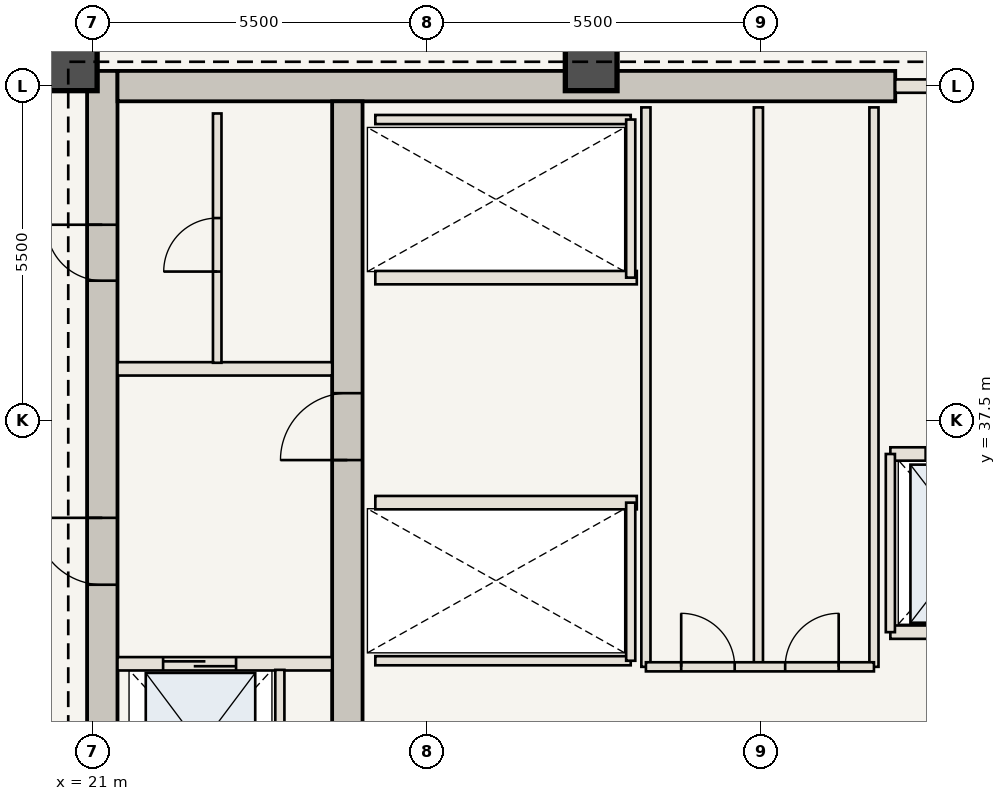
"""IFC4 building model, lengths in metres.
Left out: names, types, materials, properties, quantities, classifications, styles, units other than length and angle.
Written with IfcOpenShell. Run it as: python <this file> out.ifc"""

import sys

from ifc_helpers import new_model, si_unit, direction, frame, frame_2d, origin, origin_2d, place, context, subcontext, project, spatial, rectangle, extrude, element, fill, save


model = new_model("IFC4")
c1 = context("Model", 3, precision=1e-05, world=origin(), true_north=direction((0.0, 1.0)))
c2 = subcontext(c1, "Body", "Model", "MODEL_VIEW")
j1 = project(units=[si_unit("LENGTHUNIT", "METRE"), si_unit("PLANEANGLEUNIT", "RADIAN")], contexts=[c1])
p1 = place(None, origin())
s1 = spatial("IfcSite", under=j1, at=p1, CompositionType="ELEMENT")
p2 = place(p1, origin())
s2 = spatial("IfcBuilding", under=s1, at=p2, CompositionType="ELEMENT")
p3 = place(p2, frame((0.0, 0.0, 206.15)))
s3 = spatial("IfcBuildingStorey", under=s2, at=p3, CompositionType="ELEMENT", Elevation=206.15)
p4 = place(p3, frame((21.16, 30.6, 0.0), z_axis=(0.0, 0.0, 1.0), x_axis=(0.0, 1.0, 0.0)))
e1 = element("IfcWall", 1, at=p4, inside=s3, PredefinedType="SHEAR", context=c2, shape_type="SweptSolid", body=[
    extrude(rectangle(XDim=12.65, YDim=0.5, at=frame_2d((6.325, 0.0))), origin(), (0.0, 0.0, 1.0), 3.85),
])
p5 = place(p4, frame((4.2, 0.0, 0.0)))
e2 = element("IfcOpeningElement", 2, at=p5, cuts=e1, PredefinedType="OPENING", context=c2, shape_type="SweptSolid", body=[
    extrude(rectangle(XDim=1.1, YDim=2.15, at=frame_2d((0.55, 1.075))), frame((0.0, 0.26, 0.0), z_axis=(0.0, -1.0, 0.0), x_axis=(1.0, 0.0, 0.0)), (0.0, 0.0, 1.0), 0.52),
])
p6 = place(p4, frame((9.2, 0.0, 0.0)))
e3 = element("IfcOpeningElement", 3, at=p6, cuts=e1, PredefinedType="OPENING", context=c2, shape_type="SweptSolid", body=[
    extrude(rectangle(XDim=0.92, YDim=2.1, at=frame_2d((0.46, 1.05))), frame((0.0, 0.26, 0.0), z_axis=(0.0, -1.0, 0.0), x_axis=(1.0, 0.0, 0.0)), (0.0, 0.0, 1.0), 0.52),
])
p7 = place(p3, frame((21.41, 43.0, 0.0), z_axis=(0.0, 0.0, 1.0), x_axis=(1.0, 0.0, 0.0)))
e4 = element("IfcWall", 4, at=p7, inside=s3, PredefinedType="SHEAR", context=c2, shape_type="SweptSolid", body=[
    extrude(rectangle(XDim=12.79, YDim=0.5, at=frame_2d((6.395, 0.0))), origin(), (0.0, 0.0, 1.0), 3.85),
])
p8 = place(p3, frame((25.19, 30.6, 0.0), z_axis=(0.0, 0.0, 1.0), x_axis=(0.0, 1.0, 0.0)))
e5 = element("IfcWall", 5, at=p8, inside=s3, PredefinedType="SHEAR", context=c2, shape_type="SweptSolid", body=[
    extrude(rectangle(XDim=12.15, YDim=0.5, at=frame_2d((6.075, 0.0))), origin(), (0.0, 0.0, 1.0), 3.85),
])
p9 = place(p8, frame((6.25, 0.0, 0.0)))
e6 = element("IfcOpeningElement", 6, at=p9, cuts=e5, PredefinedType="OPENING", context=c2, shape_type="SweptSolid", body=[
    extrude(rectangle(XDim=1.1, YDim=2.15, at=frame_2d((0.55, 1.075))), frame((0.0, 0.26, 0.0), z_axis=(0.0, -1.0, 0.0), x_axis=(1.0, 0.0, 0.0)), (0.0, 0.0, 1.0), 0.52),
])
for number, where, z_axis, x_axis in (
    (7, (29.2, 43.35, 0.0), (0.0, 0.0, 1.0), (1.0, 0.0, 0.0)),
    (8, (20.65, 43.35, 0.0), (0.0, 0.0, 1.0), (1.0, 0.0, 0.0)),
):
    element("IfcColumn", number, at=place(p3, frame(where, z_axis=z_axis, x_axis=x_axis)), inside=s3, PredefinedType="COLUMN", context=c2, shape_type="SweptSolid", body=[
        extrude(rectangle(XDim=0.85, YDim=0.85, at=origin_2d()), origin(), (0.0, 0.0, 1.0), 3.85),
    ])
p10 = place(p3, frame((21.41, 33.5, 0.0), z_axis=(0.0, 0.0, 1.0), x_axis=(1.0, 0.0, 0.0)))
e9 = element("IfcWall", 9, at=p10, inside=s3, PredefinedType="STANDARD", context=c2, shape_type="SweptSolid", body=[
    extrude(rectangle(XDim=3.53, YDim=0.22, at=frame_2d((1.765, 0.0))), origin(), (0.0, 0.0, 1.0), 3.685),
])
p11 = place(p10, frame((0.75, 0.0, 0.0)))
e10 = element("IfcOpeningElement", 10, at=p11, cuts=e9, PredefinedType="OPENING", context=c2, shape_type="SweptSolid", body=[
    extrude(rectangle(XDim=1.2, YDim=2.2, at=frame_2d((0.6, 1.1))), frame((0.0, 0.12, 0.0), z_axis=(0.0, -1.0, 0.0), x_axis=(1.0, 0.0, 0.0)), (0.0, 0.0, 1.0), 0.24),
])
p12 = place(p3, frame((24.08, 30.75, 0.0), z_axis=(0.0, 0.0, 1.0), x_axis=(0.0, 1.0, 0.0)))
e11 = element("IfcWall", 11, at=p12, inside=s3, PredefinedType="STANDARD", context=c2, shape_type="SweptSolid", body=[
    extrude(rectangle(XDim=2.65, YDim=0.15, at=frame_2d((1.325, 0.0))), origin(), (0.0, 0.0, 1.0), 3.685),
])
p13 = place(p3, frame((21.41, 38.35, 0.0), z_axis=(0.0, 0.0, 1.0), x_axis=(1.0, 0.0, 0.0)))
e12 = element("IfcWall", 12, at=p13, inside=s3, PredefinedType="STANDARD", context=c2, shape_type="SweptSolid", body=[
    extrude(rectangle(XDim=3.53, YDim=0.22, at=frame_2d((1.765, 0.0))), origin(), (0.0, 0.0, 1.0), 3.685),
])
p14 = place(p3, frame((23.05, 38.45, 0.0), z_axis=(0.0, 0.0, 1.0), x_axis=(0.0, 1.0, 0.0)))
e13 = element("IfcWall", 13, at=p14, inside=s3, PredefinedType="STANDARD", context=c2, shape_type="SweptSolid", body=[
    extrude(rectangle(XDim=4.1, YDim=0.14, at=frame_2d((2.05, 0.0))), origin(), (0.0, 0.0, 1.0), 3.685),
])
p15 = place(p14, frame((1.5, 0.0, 0.0)))
e14 = element("IfcOpeningElement", 14, at=p15, cuts=e13, PredefinedType="OPENING", context=c2, shape_type="SweptSolid", body=[
    extrude(rectangle(XDim=0.88, YDim=2.1, at=frame_2d((0.44, 1.05))), frame((0.0, 0.08, 0.0), z_axis=(0.0, -1.0, 0.0), x_axis=(1.0, 0.0, 0.0)), (0.0, 0.0, 1.0), 0.16),
])
p16 = place(p3, frame((25.65, 36.15, 0.0), z_axis=(0.0, 0.0, 1.0), x_axis=(1.0, 0.0, 0.0)))
e15 = element("IfcWall", 15, at=p16, inside=s3, PredefinedType="STANDARD", context=c2, shape_type="SweptSolid", body=[
    extrude(rectangle(XDim=4.3, YDim=0.22, at=frame_2d((2.15, 0.0))), origin(), (0.0, 0.0, 1.0), 3.685),
])
p17 = place(p3, frame((25.65, 33.55, 0.0), z_axis=(0.0, 0.0, 1.0), x_axis=(1.0, 0.0, 0.0)))
e16 = element("IfcWall", 16, at=p17, inside=s3, PredefinedType="STANDARD", context=c2, shape_type="SweptSolid", body=[
    extrude(rectangle(XDim=4.2, YDim=0.15, at=frame_2d((2.1, 0.0))), origin(), (0.0, 0.0, 1.0), 3.685),
])
p18 = place(p3, frame((29.85, 33.55, 0.0), z_axis=(0.0, 0.0, 1.0), x_axis=(0.0, 1.0, 0.0)))
e17 = element("IfcWall", 17, at=p18, inside=s3, PredefinedType="STANDARD", context=c2, shape_type="SweptSolid", body=[
    extrude(rectangle(XDim=2.6, YDim=0.15, at=frame_2d((1.3, 0.0))), origin(), (0.0, 0.0, 1.0), 3.685),
])
p19 = place(p3, frame((25.65, 39.85, 0.0), z_axis=(0.0, 0.0, 1.0), x_axis=(1.0, 0.0, 0.0)))
e18 = element("IfcWall", 18, at=p19, inside=s3, PredefinedType="STANDARD", context=c2, shape_type="SweptSolid", body=[
    extrude(rectangle(XDim=4.3, YDim=0.22, at=frame_2d((2.15, 0.0))), origin(), (0.0, 0.0, 1.0), 3.685),
])
p20 = place(p3, frame((25.65, 42.45, 0.0), z_axis=(0.0, 0.0, 1.0), x_axis=(1.0, 0.0, 0.0)))
e19 = element("IfcWall", 19, at=p20, inside=s3, PredefinedType="STANDARD", context=c2, shape_type="SweptSolid", body=[
    extrude(rectangle(XDim=4.2, YDim=0.15, at=frame_2d((2.1, 0.0))), origin(), (0.0, 0.0, 1.0), 3.685),
])
p21 = place(p3, frame((29.85, 39.85, 0.0), z_axis=(0.0, 0.0, 1.0), x_axis=(0.0, 1.0, 0.0)))
e20 = element("IfcWall", 20, at=p21, inside=s3, PredefinedType="STANDARD", context=c2, shape_type="SweptSolid", body=[
    extrude(rectangle(XDim=2.6, YDim=0.15, at=frame_2d((1.3, 0.0))), origin(), (0.0, 0.0, 1.0), 3.685),
])
for number, where, z_axis, x_axis in (
    (21, (30.1, 33.45, 0.0), (0.0, 0.0, 1.0), (0.0, 1.0, 0.0)),
    (22, (31.95, 33.45, 0.0), (0.0, 0.0, 1.0), (0.0, 1.0, 0.0)),
    (23, (33.85, 33.45, 0.0), (0.0, 0.0, 1.0), (0.0, 1.0, 0.0)),
):
    element("IfcWall", number, at=place(p3, frame(where, z_axis=z_axis, x_axis=x_axis)), inside=s3, PredefinedType="STANDARD", context=c2, shape_type="SweptSolid", body=[
        extrude(rectangle(XDim=9.2, YDim=0.15, at=frame_2d((4.6, 0.0))), origin(), (0.0, 0.0, 1.0), 3.685),
    ])
p22 = place(p3, frame((30.1, 33.45, 0.0), z_axis=(0.0, 0.0, 1.0), x_axis=(1.0, 0.0, 0.0)))
e24 = element("IfcWall", 24, at=p22, inside=s3, PredefinedType="STANDARD", context=c2, shape_type="SweptSolid", body=[
    extrude(rectangle(XDim=3.75, YDim=0.15, at=frame_2d((1.875, 0.0))), origin(), (0.0, 0.0, 1.0), 3.685),
])
p23 = place(p22, frame((0.58, 0.0, 0.0)))
e25 = element("IfcOpeningElement", 25, at=p23, cuts=e24, PredefinedType="OPENING", context=c2, shape_type="SweptSolid", body=[
    extrude(rectangle(XDim=0.88, YDim=2.1, at=frame_2d((0.44, 1.05))), frame((0.0, 0.085, 0.0), z_axis=(0.0, -1.0, 0.0), x_axis=(1.0, 0.0, 0.0)), (0.0, 0.0, 1.0), 0.17),
])
p24 = place(p22, frame((2.29, 0.0, 0.0)))
e26 = element("IfcOpeningElement", 26, at=p24, cuts=e24, PredefinedType="OPENING", context=c2, shape_type="SweptSolid", body=[
    extrude(rectangle(XDim=0.88, YDim=2.1, at=frame_2d((0.44, 1.05))), frame((0.0, 0.085, 0.0), z_axis=(0.0, -1.0, 0.0), x_axis=(1.0, 0.0, 0.0)), (0.0, 0.0, 1.0), 0.17),
])
p25 = place(p3, frame((34.2, 43.0, 0.0), z_axis=(0.0, 0.0, 1.0), x_axis=(1.0, 0.0, 0.0)))
e27 = element("IfcWall", 27, at=p25, inside=s3, PredefinedType="STANDARD", context=c2, shape_type="SweptSolid", body=[
    extrude(rectangle(XDim=3.55, YDim=0.22, at=frame_2d((1.775, 0.0))), origin(), (0.0, 0.0, 1.0), 3.685),
])
p26 = place(p25, frame((1.4, 0.0, 0.0)))
e28 = element("IfcOpeningElement", 28, at=p26, cuts=e27, PredefinedType="OPENING", context=c2, shape_type="SweptSolid", body=[
    extrude(rectangle(XDim=1.1, YDim=2.15, at=frame_2d((0.55, 1.075))), frame((0.0, 0.12, 0.0), z_axis=(0.0, -1.0, 0.0), x_axis=(1.0, 0.0, 0.0)), (0.0, 0.0, 1.0), 0.24),
])
p27 = place(p3, frame((34.12, 36.95, 0.0), z_axis=(0.0, 0.0, 1.0), x_axis=(1.0, 0.0, 0.0)))
e29 = element("IfcWall", 29, at=p27, inside=s3, PredefinedType="STANDARD", context=c2, shape_type="SweptSolid", body=[
    extrude(rectangle(XDim=2.68, YDim=0.22, at=frame_2d((1.34, 0.0))), origin(), (0.0, 0.0, 1.0), 3.685),
])
p28 = place(p27, frame((0.58, 0.0, 0.0)))
e30 = element("IfcOpeningElement", 30, at=p28, cuts=e29, PredefinedType="OPENING", context=c2, shape_type="SweptSolid", body=[
    extrude(rectangle(XDim=1.2, YDim=2.2, at=frame_2d((0.6, 1.1))), frame((0.0, 0.12, 0.0), z_axis=(0.0, -1.0, 0.0), x_axis=(1.0, 0.0, 0.0)), (0.0, 0.0, 1.0), 0.24),
])
p29 = place(p3, frame((34.12, 34.02, 0.0), z_axis=(0.0, 0.0, 1.0), x_axis=(1.0, 0.0, 0.0)))
e31 = element("IfcWall", 31, at=p29, inside=s3, PredefinedType="STANDARD", context=c2, shape_type="SweptSolid", body=[
    extrude(rectangle(XDim=2.68, YDim=0.22, at=frame_2d((1.34, 0.0))), origin(), (0.0, 0.0, 1.0), 3.685),
])
p30 = place(p3, frame((34.12, 34.02, 0.0), z_axis=(0.0, 0.0, 1.0), x_axis=(0.0, 1.0, 0.0)))
e32 = element("IfcWall", 32, at=p30, inside=s3, PredefinedType="STANDARD", context=c2, shape_type="SweptSolid", body=[
    extrude(rectangle(XDim=2.93, YDim=0.15, at=frame_2d((1.465, 0.0))), origin(), (0.0, 0.0, 1.0), 3.685),
])
p31 = place(p5, origin())
e33 = element("IfcDoor", 33, at=p31, inside=s3, OperationType="SINGLE_SWING_RIGHT", PredefinedType="DOOR", context=c2, shape_type="SweptSolid", body=[
    extrude(rectangle(XDim=1.1, YDim=2.15, at=frame_2d((0.55, 1.075))), frame((0.0, 0.025, 0.0), z_axis=(0.0, -1.0, 0.0), x_axis=(1.0, 0.0, 0.0)), (0.0, 0.0, 1.0), 0.05),
])
fill(e2, e33)
p32 = place(p9, origin())
e34 = element("IfcDoor", 34, at=p32, inside=s3, OperationType="SINGLE_SWING_LEFT", PredefinedType="DOOR", context=c2, shape_type="SweptSolid", body=[
    extrude(rectangle(XDim=1.1, YDim=2.15, at=frame_2d((0.55, 1.075))), frame((0.0, 0.025, 0.0), z_axis=(0.0, -1.0, 0.0), x_axis=(1.0, 0.0, 0.0)), (0.0, 0.0, 1.0), 0.05),
])
fill(e6, e34)
p33 = place(p6, origin())
e35 = element("IfcDoor", 35, at=p33, inside=s3, OperationType="SINGLE_SWING_RIGHT", PredefinedType="DOOR", context=c2, shape_type="SweptSolid", body=[
    extrude(rectangle(XDim=0.92, YDim=2.1, at=frame_2d((0.46, 1.05))), frame((0.0, 0.025, 0.0), z_axis=(0.0, -1.0, 0.0), x_axis=(1.0, 0.0, 0.0)), (0.0, 0.0, 1.0), 0.05),
])
fill(e3, e35)
p34 = place(p11, origin())
e36 = element("IfcDoor", 36, at=p34, inside=s3, OperationType="DOUBLE_DOOR_SLIDING", PredefinedType="DOOR", context=c2, shape_type="SweptSolid", body=[
    extrude(rectangle(XDim=1.2, YDim=2.2, at=frame_2d((0.6, 1.1))), frame((0.0, 0.025, 0.0), z_axis=(0.0, -1.0, 0.0), x_axis=(1.0, 0.0, 0.0)), (0.0, 0.0, 1.0), 0.05),
])
fill(e10, e36)
p35 = place(p15, origin())
e37 = element("IfcDoor", 37, at=p35, inside=s3, OperationType="SINGLE_SWING_LEFT", PredefinedType="DOOR", context=c2, shape_type="SweptSolid", body=[
    extrude(rectangle(XDim=0.88, YDim=2.1, at=frame_2d((0.44, 1.05))), frame((0.0, 0.025, 0.0), z_axis=(0.0, -1.0, 0.0), x_axis=(1.0, 0.0, 0.0)), (0.0, 0.0, 1.0), 0.05),
])
fill(e14, e37)
p36 = place(p23, origin())
e38 = element("IfcDoor", 38, at=p36, inside=s3, OperationType="SINGLE_SWING_LEFT", PredefinedType="DOOR", context=c2, shape_type="SweptSolid", body=[
    extrude(rectangle(XDim=0.88, YDim=2.1, at=frame_2d((0.44, 1.05))), frame((0.0, 0.025, 0.0), z_axis=(0.0, -1.0, 0.0), x_axis=(1.0, 0.0, 0.0)), (0.0, 0.0, 1.0), 0.05),
])
fill(e25, e38)
p37 = place(p24, origin())
e39 = element("IfcDoor", 39, at=p37, inside=s3, OperationType="SINGLE_SWING_RIGHT", PredefinedType="DOOR", context=c2, shape_type="SweptSolid", body=[
    extrude(rectangle(XDim=0.88, YDim=2.1, at=frame_2d((0.44, 1.05))), frame((0.0, 0.025, 0.0), z_axis=(0.0, -1.0, 0.0), x_axis=(1.0, 0.0, 0.0)), (0.0, 0.0, 1.0), 0.05),
])
fill(e26, e39)
p38 = place(p28, origin())
e40 = element("IfcDoor", 40, at=p38, inside=s3, OperationType="DOUBLE_DOOR_SLIDING", PredefinedType="DOOR", context=c2, shape_type="SweptSolid", body=[
    extrude(rectangle(XDim=1.2, YDim=2.2, at=frame_2d((0.6, 1.1))), frame((0.0, 0.025, 0.0), z_axis=(0.0, -1.0, 0.0), x_axis=(1.0, 0.0, 0.0)), (0.0, 0.0, 1.0), 0.05),
])
fill(e30, e40)
save(model, sys.argv[1])
